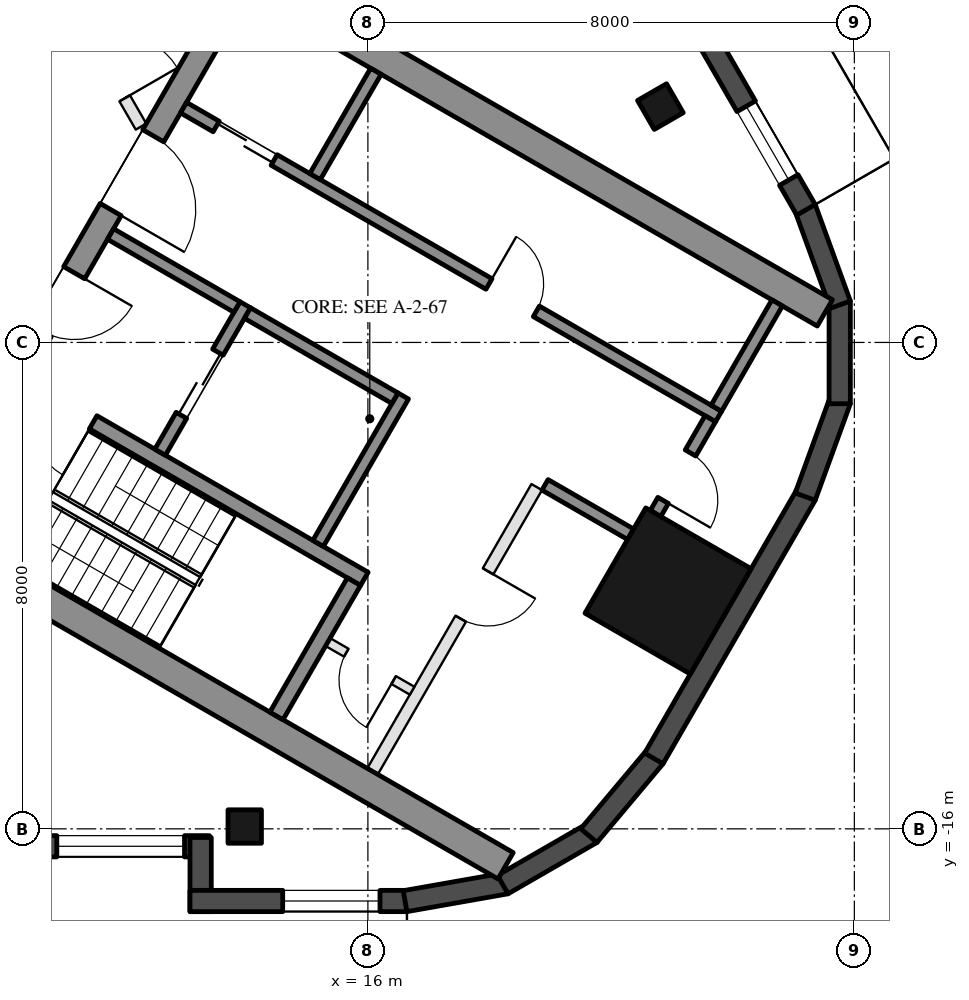
"""IFC4 building model, lengths in metres.
Left out: names, types, materials, properties, quantities, classifications, styles, units other than length and angle.
Written with IfcOpenShell. Run it as: python <this file> out.ifc"""

import sys

from ifc_helpers import new_model, si_unit, direction, frame, frame_2d, origin, origin_2d, place, context, subcontext, project, spatial, rectangle, hollow_rectangle, extrude, boolean, halfspace, element, fill, save


model = new_model("IFC4")
c1 = context("Model", 3, precision=1e-05, world=origin(), true_north=direction((0.0, 1.0)))
c2 = subcontext(c1, "Body", "Model", "MODEL_VIEW")
j1 = project(units=[si_unit("LENGTHUNIT", "METRE"), si_unit("PLANEANGLEUNIT", "RADIAN")], contexts=[c1])
p1 = place(None, origin())
s1 = spatial("IfcSite", under=j1, at=p1, CompositionType="ELEMENT")
p2 = place(p1, origin())
s2 = spatial("IfcBuilding", under=s1, at=p2, CompositionType="ELEMENT")
p3 = place(p2, frame((0.0, 0.0, 291.1)))
s3 = spatial("IfcBuildingStorey", under=s2, at=p3, CompositionType="ELEMENT", Elevation=291.1)
for number, where, z_axis, x_axis in (
    (1, (13.974, -15.962, 0.0), (0.0, 0.0, 1.0), (-1.0, 0.0, 0.0)),
    (2, (20.81, -4.121, 0.0), (0.0, 0.0, 1.0), (-0.5, 0.866, 0.0)),
):
    element("IfcColumn", number, at=place(p3, frame(where, z_axis=z_axis, x_axis=x_axis)), inside=s3, PredefinedType="COLUMN", context=c2, shape_type="SweptSolid", body=[
        boolean("DIFFERENCE", extrude(hollow_rectangle(XDim=0.55, YDim=0.55, WallThickness=0.025, at=origin_2d()), origin(), (0.0, 0.0, 1.0), 3.7), halfspace(frame((0.0, 0.0, 0.04), z_axis=(0.0, 0.0, 1.0), x_axis=(1.0, 0.0, 0.0)), True)),
    ])
p4 = place(p3, frame((20.936, -12.087, 0.0), z_axis=(0.0, 0.0, 1.0), x_axis=(0.5, 0.866025403784, 0.0)))
e3 = element("IfcColumn", 3, at=p4, inside=s3, PredefinedType="COLUMN", context=c2, shape_type="SweptSolid", body=[
    boolean("DIFFERENCE", extrude(hollow_rectangle(XDim=2.0, YDim=2.0, WallThickness=0.05, at=origin_2d()), origin(), (0.0, 0.0, 1.0), 3.7), halfspace(frame((0.0, 0.0, 0.113), z_axis=(0.0, 0.0, 1.0), x_axis=(1.0, 0.0, 0.0)), True)),
])
p5 = place(p3, frame((7.567, -16.287, 0.0), z_axis=(0.0, 0.0, 1.0), x_axis=(1.0, 0.0, 0.0)))
e4 = element("IfcWall", 4, at=p5, inside=s3, PredefinedType="SOLIDWALL", context=c2, shape_type="SweptSolid", body=[
    extrude(rectangle(XDim=5.827, YDim=0.35, at=frame_2d((2.914, 0.0))), origin(), (0.0, 0.0, 1.0), 3.55),
])
p6 = place(p5, frame((0.617, 0.0, 0.0)))
e5 = element("IfcOpeningElement", 5, at=p6, cuts=e4, PredefinedType="OPENING", context=c2, shape_type="SweptSolid", body=[
    extrude(rectangle(XDim=2.4, YDim=2.4, at=frame_2d((1.2, 1.2))), frame((0.0, 0.185, 0.0), z_axis=(0.0, -1.0, 0.0), x_axis=(1.0, 0.0, 0.0)), (0.0, 0.0, 1.0), 0.37),
])
p7 = place(p5, frame((3.317, 0.0, 0.3)))
e6 = element("IfcOpeningElement", 6, at=p7, cuts=e4, PredefinedType="OPENING", context=c2, shape_type="SweptSolid", body=[
    extrude(rectangle(XDim=2.1, YDim=2.65, at=frame_2d((1.05, 1.325))), frame((0.0, 0.185, 0.0), z_axis=(0.0, -1.0, 0.0), x_axis=(1.0, 0.0, 0.0)), (0.0, 0.0, 1.0), 0.37),
])
p8 = place(p3, frame((13.249, -16.142, 0.0), z_axis=(0.0, 0.0, 1.0), x_axis=(0.0, -1.0, 0.0)))
e7 = element("IfcWall", 7, at=p8, inside=s3, PredefinedType="SOLIDWALL", context=c2, shape_type="SweptSolid", body=[
    extrude(rectangle(XDim=1.22, YDim=0.35, at=frame_2d((0.61, 0.0))), origin(), (0.0, 0.0, 1.0), 3.55),
])
p9 = place(p3, frame((13.074, -17.187, 0.0), z_axis=(0.0, 0.0, 1.0), x_axis=(1.0, 0.0, 0.0)))
e8 = element("IfcWall", 8, at=p9, inside=s3, PredefinedType="SOLIDWALL", context=c2, shape_type="SweptSolid", body=[
    extrude(rectangle(XDim=3.567, YDim=0.35, at=frame_2d((1.784, 0.0))), origin(), (0.0, 0.0, 1.0), 3.55),
])
p10 = place(p9, frame((1.525, 0.0, 0.3)))
e9 = element("IfcOpeningElement", 9, at=p10, cuts=e8, PredefinedType="OPENING", context=c2, shape_type="SweptSolid", body=[
    extrude(rectangle(XDim=1.6, YDim=2.65, at=frame_2d((0.8, 1.325))), frame((0.0, 0.185, 0.0), z_axis=(0.0, -1.0, 0.0), x_axis=(1.0, 0.0, 0.0)), (0.0, 0.0, 1.0), 0.37),
])
for number, where, z_axis, x_axis in (
    (10, (16.611, -17.189, 0.0), (0.0, 0.0, 1.0), (0.985, 0.174, 0.0)),
    (11, (18.218, -16.917, 0.0), (0.0, 0.0, 1.0), (0.866, 0.5, 0.0)),
):
    element("IfcWall", number, at=place(p3, frame(where, z_axis=z_axis, x_axis=x_axis)), inside=s3, PredefinedType="SOLIDWALL", context=c2, shape_type="SweptSolid", body=[
        extrude(rectangle(XDim=1.689, YDim=0.35, at=frame_2d((0.845, 0.0))), origin(), (0.0, 0.0, 1.0), 3.55),
    ])
p11 = place(p3, frame((19.635, -16.111, 0.0), z_axis=(0.0, 0.0, 1.0), x_axis=(0.642697100627, 0.766120380127, 0.0)))
e12 = element("IfcWall", 12, at=p11, inside=s3, PredefinedType="SOLIDWALL", context=c2, shape_type="SweptSolid", body=[
    extrude(rectangle(XDim=1.689, YDim=0.35, at=frame_2d((0.845, 0.0))), origin(), (0.0, 0.0, 1.0), 3.55),
])
p12 = place(p3, frame((20.703, -14.842, 0.0), z_axis=(0.0, 0.0, 1.0), x_axis=(0.500016662025, 0.866015783746, 0.0)))
e13 = element("IfcWall", 13, at=p12, inside=s3, PredefinedType="SOLIDWALL", context=c2, shape_type="SweptSolid", body=[
    extrude(rectangle(XDim=5.004, YDim=0.35, at=frame_2d((2.502, 0.0))), origin(), (0.0, 0.0, 1.0), 3.55),
])
for number, where, z_axis, x_axis in (
    (14, (23.192, -10.536, 0.0), (0.0, 0.0, 1.0), (0.342, 0.94, 0.0)),
    (15, (23.759, -9.008, 0.0), (0.0, 0.0, 1.0), (0.0, 1.0, 0.0)),
    (16, (23.77, -7.379, 0.0), (0.0, 0.0, 1.0), (-0.342, 0.94, 0.0)),
):
    element("IfcWall", number, at=place(p3, frame(where, z_axis=z_axis, x_axis=x_axis)), inside=s3, PredefinedType="SOLIDWALL", context=c2, shape_type="SweptSolid", body=[
        extrude(rectangle(XDim=1.689, YDim=0.35, at=frame_2d((0.845, 0.0))), origin(), (0.0, 0.0, 1.0), 3.55),
    ])
p13 = place(p3, frame((23.205, -5.819, 0.0), z_axis=(0.0, 0.0, 1.0), x_axis=(-0.500010118922, 0.866019561543, 0.0)))
e17 = element("IfcWall", 17, at=p13, inside=s3, PredefinedType="SOLIDWALL", context=c2, shape_type="SweptSolid", body=[
    extrude(rectangle(XDim=10.554, YDim=0.35, at=frame_2d((5.277, 0.0))), origin(), (0.0, 0.0, 1.0), 3.55),
])
p14 = place(p13, frame((0.566, 0.0, 0.3)))
e18 = element("IfcOpeningElement", 18, at=p14, cuts=e17, PredefinedType="OPENING", context=c2, shape_type="SweptSolid", body=[
    extrude(rectangle(XDim=1.4, YDim=2.65, at=frame_2d((0.7, 1.325))), frame((0.0, 0.185, 0.0), z_axis=(0.0, -1.0, 0.0), x_axis=(1.0, 0.0, 0.0)), (0.0, 0.0, 1.0), 0.37),
])
p15 = place(p13, frame((6.63, 0.0, 0.0)))
e19 = element("IfcOpeningElement", 19, at=p15, cuts=e17, PredefinedType="OPENING", context=c2, shape_type="SweptSolid", body=[
    extrude(rectangle(XDim=2.4, YDim=2.4, at=frame_2d((1.2, 1.2))), frame((0.0, 0.185, 0.0), z_axis=(0.0, -1.0, 0.0), x_axis=(1.0, 0.0, 0.0)), (0.0, 0.0, 1.0), 0.37),
])
p16 = place(p13, frame((3.292, 0.0, 0.3)))
e20 = element("IfcOpeningElement", 20, at=p16, cuts=e17, PredefinedType="OPENING", context=c2, shape_type="SweptSolid", body=[
    extrude(rectangle(XDim=3.0, YDim=2.65, at=frame_2d((1.5, 1.325))), frame((0.0, 0.185, 0.0), z_axis=(0.0, -1.0, 0.0), x_axis=(1.0, 0.0, 0.0)), (0.0, 0.0, 1.0), 0.37),
])
for number, where, z_axis, x_axis in (
    (21, (8.547, -10.997, 0.0), (0.0, 0.0, 1.0), (0.866, -0.5, 0.0)),
    (22, (13.797, -1.903, 0.0), (0.0, 0.0, 1.0), (0.866, -0.5, 0.0)),
):
    element("IfcWall", number, at=place(p3, frame(where, z_axis=z_axis, x_axis=x_axis)), inside=s3, PredefinedType="SHEAR", context=c2, shape_type="SweptSolid", body=[
        extrude(rectangle(XDim=11.222, YDim=0.5, at=frame_2d((5.611, 0.0))), origin(), (0.0, 0.0, 1.0), 3.5),
    ])
p17 = place(p3, frame((8.845, -10.88, 0.0), z_axis=(0.0, 0.0, 1.0), x_axis=(0.500004234368, 0.866022959057, 0.0)))
e23 = element("IfcWall", 23, at=p17, inside=s3, PredefinedType="SHEAR", context=c2, shape_type="SweptSolid", body=[
    extrude(rectangle(XDim=10.0, YDim=0.4, at=frame_2d((5.0, 0.0))), origin(), (0.0, 0.0, 1.0), 3.5),
])
p18 = place(p17, frame((3.55, 0.0, 0.0)))
e24 = element("IfcOpeningElement", 24, at=p18, cuts=e23, PredefinedType="OPENING", context=c2, shape_type="SweptSolid", body=[
    extrude(rectangle(XDim=1.1, YDim=2.1, at=frame_2d((0.55, 1.05))), frame((0.0, 0.21, 0.0), z_axis=(0.0, -1.0, 0.0), x_axis=(1.0, 0.0, 0.0)), (0.0, 0.0, 1.0), 0.42),
])
p19 = place(p17, frame((5.85, 0.0, 0.0)))
e25 = element("IfcOpeningElement", 25, at=p19, cuts=e23, PredefinedType="OPENING", context=c2, shape_type="SweptSolid", body=[
    extrude(rectangle(XDim=1.4, YDim=2.1, at=frame_2d((0.7, 1.05))), frame((0.0, 0.21, 0.0), z_axis=(0.0, -1.0, 0.0), x_axis=(1.0, 0.0, 0.0)), (0.0, 0.0, 1.0), 0.42),
])
p20 = place(p3, frame((10.356, -8.664, 0.0), z_axis=(0.0, 0.0, 1.0), x_axis=(0.866028629588, -0.499994412703, 0.0)))
e26 = element("IfcWall", 26, at=p20, inside=s3, PredefinedType="SHEAR", context=c2, shape_type="SweptSolid", body=[
    extrude(rectangle(XDim=6.45, YDim=0.25, at=frame_2d((3.225, 0.0))), origin(), (0.0, 0.0, 1.0), 3.5),
])
p21 = place(p20, frame((0.3, 0.0, 0.0)))
e27 = element("IfcOpeningElement", 27, at=p21, cuts=e26, PredefinedType="OPENING", context=c2, shape_type="SweptSolid", body=[
    extrude(rectangle(XDim=1.0, YDim=2.1, at=frame_2d((0.5, 1.05))), frame((0.0, 0.135, 0.0), z_axis=(0.0, -1.0, 0.0), x_axis=(1.0, 0.0, 0.0)), (0.0, 0.0, 1.0), 0.27),
])
p22 = place(p3, frame((14.496, -14.143, 0.0), z_axis=(0.0, 0.0, 1.0), x_axis=(0.500062241894, 0.865989465428, 0.0)))
e28 = element("IfcWall", 28, at=p22, inside=s3, PredefinedType="SHEAR", context=c2, shape_type="SweptSolid", body=[
    extrude(rectangle(XDim=2.55, YDim=0.25, at=frame_2d((1.275, 0.0))), origin(), (0.0, 0.0, 1.0), 3.5),
])
p23 = place(p3, frame((15.181, -11.305, 0.0), z_axis=(0.0, 0.0, 1.0), x_axis=(0.49994636267, 0.866056369097, 0.0)))
e29 = element("IfcWall", 29, at=p23, inside=s3, PredefinedType="SHEAR", context=c2, shape_type="SweptSolid", body=[
    extrude(rectangle(XDim=2.8, YDim=0.2, at=frame_2d((1.4, 0.0))), origin(), (0.0, 0.0, 1.0), 3.5),
])
p24 = place(p3, frame((12.583, -9.805, 0.0), z_axis=(0.0, 0.0, 1.0), x_axis=(0.49994636267, 0.866056369097, 0.0)))
e30 = element("IfcWall", 30, at=p24, inside=s3, PredefinedType="SHEAR", context=c2, shape_type="SweptSolid", body=[
    extrude(rectangle(XDim=2.8, YDim=0.2, at=frame_2d((1.4, 0.0))), origin(), (0.0, 0.0, 1.0), 3.5),
])
p25 = place(p24, frame((0.7, 0.0, 0.0)))
e31 = element("IfcOpeningElement", 31, at=p25, cuts=e30, PredefinedType="OPENING", context=c2, shape_type="SweptSolid", body=[
    extrude(rectangle(XDim=1.2, YDim=2.1, at=frame_2d((0.6, 1.05))), frame((0.0, 0.11, 0.0), z_axis=(0.0, -1.0, 0.0), x_axis=(1.0, 0.0, 0.0)), (0.0, 0.0, 1.0), 0.22),
])
p26 = place(p3, frame((11.768, -6.217, 0.0), z_axis=(0.0, 0.0, 1.0), x_axis=(0.866050077142, -0.499957262057, 0.0)))
e32 = element("IfcWall", 32, at=p26, inside=s3, PredefinedType="SHEAR", context=c2, shape_type="SweptSolid", body=[
    extrude(rectangle(XDim=2.4, YDim=0.2, at=frame_2d((1.2, 0.0))), origin(), (0.0, 0.0, 1.0), 3.5),
])
p27 = place(p3, frame((14.02, -7.517, 0.0), z_axis=(0.0, 0.0, 1.0), x_axis=(0.866034573852, -0.49998411664, 0.0)))
e33 = element("IfcWall", 33, at=p27, inside=s3, PredefinedType="SHEAR", context=c2, shape_type="SweptSolid", body=[
    extrude(rectangle(XDim=2.8, YDim=0.2, at=frame_2d((1.4, 0.0))), origin(), (0.0, 0.0, 1.0), 3.5),
])
p28 = place(p3, frame((12.968, -4.138, 0.0), z_axis=(0.0, 0.0, 1.0), x_axis=(0.866028328073, -0.49999493495, 0.0)))
e34 = element("IfcWall", 34, at=p28, inside=s3, PredefinedType="SHEAR", context=c2, shape_type="SweptSolid", body=[
    extrude(rectangle(XDim=10.16, YDim=0.2, at=frame_2d((5.08, 0.0))), origin(), (0.0, 0.0, 1.0), 3.5),
])
p29 = place(p28, frame((0.62, 0.0, 0.0)))
e35 = element("IfcOpeningElement", 35, at=p29, cuts=e34, PredefinedType="OPENING", context=c2, shape_type="SweptSolid", body=[
    extrude(rectangle(XDim=1.1, YDim=2.1, at=frame_2d((0.55, 1.05))), frame((0.0, 0.11, 0.0), z_axis=(0.0, -1.0, 0.0), x_axis=(1.0, 0.0, 0.0)), (0.0, 0.0, 1.0), 0.22),
])
p30 = place(p28, frame((5.8, 0.0, 0.0)))
e36 = element("IfcOpeningElement", 36, at=p30, cuts=e34, PredefinedType="OPENING", context=c2, shape_type="SweptSolid", body=[
    extrude(rectangle(XDim=0.9, YDim=2.1, at=frame_2d((0.45, 1.05))), frame((0.0, 0.11, 0.0), z_axis=(0.0, -1.0, 0.0), x_axis=(1.0, 0.0, 0.0)), (0.0, 0.0, 1.0), 0.22),
])
p31 = place(p3, frame((20.73, -10.814, 0.0), z_axis=(0.0, 0.0, 1.0), x_axis=(0.499961193289, 0.866047807691, 0.0)))
e37 = element("IfcWall", 37, at=p31, inside=s3, PredefinedType="SHEAR", context=c2, shape_type="SweptSolid", body=[
    extrude(rectangle(XDim=1.8, YDim=0.2, at=frame_2d((0.9, 0.0))), origin(), (0.0, 0.0, 1.0), 3.5),
])
p32 = place(p31, frame((0.25, 0.0, 0.0)))
e38 = element("IfcOpeningElement", 38, at=p32, cuts=e37, PredefinedType="OPENING", context=c2, shape_type="SweptSolid", body=[
    extrude(rectangle(XDim=0.9, YDim=2.1, at=frame_2d((0.45, 1.05))), frame((0.0, 0.11, 0.0), z_axis=(0.0, -1.0, 0.0), x_axis=(1.0, 0.0, 0.0)), (0.0, 0.0, 1.0), 0.22),
])
p33 = place(p3, frame((18.913, -10.342, 0.0), z_axis=(0.0, 0.0, 1.0), x_axis=(0.866053003207, -0.499952193351, 0.0)))
e39 = element("IfcWall", 39, at=p33, inside=s3, PredefinedType="SHEAR", context=c2, shape_type="SweptSolid", body=[
    extrude(rectangle(XDim=1.625, YDim=0.2, at=frame_2d((0.812, 0.0))), origin(), (0.0, 0.0, 1.0), 3.5),
])
for number, where, z_axis, x_axis in (
    (40, (15.131, -5.272, 0.0), (0.0, 0.0, 1.0), (0.5, 0.866, 0.0)),
    (41, (21.73, -9.082, 0.0), (0.0, 0.0, 1.0), (0.5, 0.866, 0.0)),
):
    element("IfcWall", number, at=place(p3, frame(where, z_axis=z_axis, x_axis=x_axis)), inside=s3, PredefinedType="SHEAR", context=c2, shape_type="SweptSolid", body=[
        extrude(rectangle(XDim=2.0, YDim=0.2, at=frame_2d((1.0, 0.0))), origin(), (0.0, 0.0, 1.0), 3.5),
    ])
p34 = place(p3, frame((16.076, -15.055, 0.0), z_axis=(0.0, 0.0, 1.0), x_axis=(0.499995103361, 0.866028230842, 0.0)))
e42 = element("IfcWall", 42, at=p34, inside=s3, PredefinedType="PARTITIONING", context=c2, shape_type="SweptSolid", body=[
    extrude(rectangle(XDim=5.4, YDim=0.2, at=frame_2d((2.7, 0.0))), origin(), (0.0, 0.0, 1.0), 3.5),
])
p35 = place(p34, frame((2.9, 0.0, 0.0)))
e43 = element("IfcOpeningElement", 43, at=p35, cuts=e42, PredefinedType="OPENING", context=c2, shape_type="SweptSolid", body=[
    extrude(rectangle(XDim=0.9, YDim=2.1, at=frame_2d((0.45, 1.05))), frame((0.0, 0.11, 0.0), z_axis=(0.0, -1.0, 0.0), x_axis=(1.0, 0.0, 0.0)), (0.0, 0.0, 1.0), 0.22),
])
p36 = place(p3, frame((15.342, -12.928, 0.0), z_axis=(0.0, 0.0, 1.0), x_axis=(0.865989903783, -0.500061482766, 0.0)))
e44 = element("IfcWall", 44, at=p36, inside=s3, PredefinedType="PARTITIONING", context=c2, shape_type="SweptSolid", body=[
    extrude(rectangle(XDim=1.6, YDim=0.15, at=frame_2d((0.8, 0.0))), origin(), (0.0, 0.0, 1.0), 3.5),
])
p37 = place(p36, frame((0.35, 0.0, 0.0)))
e45 = element("IfcOpeningElement", 45, at=p37, cuts=e44, PredefinedType="OPENING", context=c2, shape_type="SweptSolid", body=[
    extrude(rectangle(XDim=0.9, YDim=2.1, at=frame_2d((0.45, 1.05))), frame((0.0, 0.085, 0.0), z_axis=(0.0, -1.0, 0.0), x_axis=(1.0, 0.0, 0.0)), (0.0, 0.0, 1.0), 0.17),
])
p38 = place(p3, frame((10.269, -0.986, 0.0), z_axis=(0.0, 0.0, 1.0), x_axis=(0.50004472278, -0.865999581536, 0.0)))
e46 = element("IfcWall", 46, at=p38, inside=s3, PredefinedType="PARTITIONING", context=c2, shape_type="SweptSolid", body=[
    extrude(rectangle(XDim=4.0, YDim=0.2, at=frame_2d((2.0, 0.0))), origin(), (0.0, 0.0, 1.0), 3.05),
])
p39 = place(p38, frame((2.463, 0.0, 0.0)))
e47 = element("IfcOpeningElement", 47, at=p39, cuts=e46, PredefinedType="OPENING", context=c2, shape_type="SweptSolid", body=[
    extrude(rectangle(XDim=1.0, YDim=2.1, at=frame_2d((0.5, 1.05))), frame((0.0, 0.11, 0.0), z_axis=(0.0, -1.0, 0.0), x_axis=(1.0, 0.0, 0.0)), (0.0, 0.0, 1.0), 0.22),
])
p40 = place(p7, origin())
e48 = element("IfcWindow", 48, at=p40, inside=s3, PartitioningType="SINGLE_PANEL", PredefinedType="WINDOW", context=c2, shape_type="SweptSolid", body=[
    extrude(rectangle(XDim=2.1, YDim=2.65, at=frame_2d((1.05, 1.325))), frame((0.0, 0.03, 0.0), z_axis=(0.0, -1.0, 0.0), x_axis=(1.0, 0.0, 0.0)), (0.0, 0.0, 1.0), 0.06),
])
fill(e6, e48)
p41 = place(p10, origin())
e49 = element("IfcWindow", 49, at=p41, inside=s3, PartitioningType="SINGLE_PANEL", PredefinedType="WINDOW", context=c2, shape_type="SweptSolid", body=[
    extrude(rectangle(XDim=1.6, YDim=2.65, at=frame_2d((0.8, 1.325))), frame((0.0, 0.03, 0.0), z_axis=(0.0, -1.0, 0.0), x_axis=(1.0, 0.0, 0.0)), (0.0, 0.0, 1.0), 0.06),
])
fill(e9, e49)
p42 = place(p14, origin())
e50 = element("IfcWindow", 50, at=p42, inside=s3, PartitioningType="SINGLE_PANEL", PredefinedType="WINDOW", context=c2, shape_type="SweptSolid", body=[
    extrude(rectangle(XDim=1.4, YDim=2.65, at=frame_2d((0.7, 1.325))), frame((0.0, 0.03, 0.0), z_axis=(0.0, -1.0, 0.0), x_axis=(1.0, 0.0, 0.0)), (0.0, 0.0, 1.0), 0.06),
])
fill(e18, e50)
p43 = place(p25, origin())
e51 = element("IfcDoor", 51, at=p43, inside=s3, OperationType="DOUBLE_DOOR_SLIDING", PredefinedType="DOOR", context=c2, shape_type="SweptSolid", body=[
    extrude(rectangle(XDim=1.2, YDim=2.1, at=frame_2d((0.6, 1.05))), frame((0.0, 0.025, 0.0), z_axis=(0.0, -1.0, 0.0), x_axis=(1.0, 0.0, 0.0)), (0.0, 0.0, 1.0), 0.05),
])
fill(e31, e51)
p44 = place(p37, frame((0.9, 0.0, 0.0), z_axis=(0.0, 0.0, 1.0), x_axis=(-1.0, 0.0, 0.0)))
e52 = element("IfcDoor", 52, at=p44, inside=s3, OperationType="SINGLE_SWING_LEFT", PredefinedType="DOOR", context=c2, shape_type="SweptSolid", body=[
    extrude(rectangle(XDim=0.9, YDim=2.1, at=frame_2d((0.45, 1.05))), frame((0.0, 0.025, 0.0), z_axis=(0.0, -1.0, 0.0), x_axis=(1.0, 0.0, 0.0)), (0.0, 0.0, 1.0), 0.05),
])
fill(e45, e52)
p45 = place(p29, origin())
e53 = element("IfcDoor", 53, at=p45, inside=s3, OperationType="DOUBLE_DOOR_SLIDING", PredefinedType="DOOR", context=c2, shape_type="SweptSolid", body=[
    extrude(rectangle(XDim=1.1, YDim=2.1, at=frame_2d((0.55, 1.05))), frame((0.0, 0.025, 0.0), z_axis=(0.0, -1.0, 0.0), x_axis=(1.0, 0.0, 0.0)), (0.0, 0.0, 1.0), 0.05),
])
fill(e35, e53)
p46 = place(p30, origin())
e54 = element("IfcDoor", 54, at=p46, inside=s3, OperationType="SINGLE_SWING_LEFT", PredefinedType="DOOR", context=c2, shape_type="SweptSolid", body=[
    extrude(rectangle(XDim=0.9, YDim=2.1, at=frame_2d((0.45, 1.05))), frame((0.0, 0.025, 0.0), z_axis=(0.0, -1.0, 0.0), x_axis=(1.0, 0.0, 0.0)), (0.0, 0.0, 1.0), 0.05),
])
fill(e36, e54)
p47 = place(p32, frame((0.9, 0.0, 0.0), z_axis=(0.0, 0.0, 1.0), x_axis=(-1.0, 0.0, 0.0)))
e55 = element("IfcDoor", 55, at=p47, inside=s3, OperationType="SINGLE_SWING_RIGHT", PredefinedType="DOOR", context=c2, shape_type="SweptSolid", body=[
    extrude(rectangle(XDim=0.9, YDim=2.1, at=frame_2d((0.45, 1.05))), frame((0.0, 0.025, 0.0), z_axis=(0.0, -1.0, 0.0), x_axis=(1.0, 0.0, 0.0)), (0.0, 0.0, 1.0), 0.05),
])
fill(e38, e55)
p48 = place(p35, frame((0.9, 0.0, 0.0), z_axis=(0.0, 0.0, 1.0), x_axis=(-1.0, 0.0, 0.0)))
e56 = element("IfcDoor", 56, at=p48, inside=s3, OperationType="SINGLE_SWING_LEFT", PredefinedType="DOOR", context=c2, shape_type="SweptSolid", body=[
    extrude(rectangle(XDim=0.9, YDim=2.1, at=frame_2d((0.45, 1.05))), frame((0.0, 0.025, 0.0), z_axis=(0.0, -1.0, 0.0), x_axis=(1.0, 0.0, 0.0)), (0.0, 0.0, 1.0), 0.05),
])
fill(e43, e56)
p49 = place(p18, frame((1.1, 0.0, 0.0), z_axis=(0.0, 0.0, 1.0), x_axis=(-1.0, 0.0, 0.0)))
e57 = element("IfcDoor", 57, at=p49, inside=s3, OperationType="SINGLE_SWING_LEFT", PredefinedType="DOOR", context=c2, shape_type="SweptSolid", body=[
    extrude(rectangle(XDim=1.1, YDim=2.1, at=frame_2d((0.55, 1.05))), frame((0.0, 0.025, 0.0), z_axis=(0.0, -1.0, 0.0), x_axis=(1.0, 0.0, 0.0)), (0.0, 0.0, 1.0), 0.05),
])
fill(e24, e57)
p50 = place(p19, frame((1.4, 0.0, 0.0), z_axis=(0.0, 0.0, 1.0), x_axis=(-1.0, 0.0, 0.0)))
e58 = element("IfcDoor", 58, at=p50, inside=s3, OperationType="DOUBLE_DOOR_SINGLE_SWING", PredefinedType="DOOR", context=c2, shape_type="SweptSolid", body=[
    extrude(rectangle(XDim=1.4, YDim=2.1, at=frame_2d((0.7, 1.05))), frame((0.0, 0.025, 0.0), z_axis=(0.0, -1.0, 0.0), x_axis=(1.0, 0.0, 0.0)), (0.0, 0.0, 1.0), 0.05),
])
fill(e25, e58)
p51 = place(p21, frame((1.0, 0.0, 0.0), z_axis=(0.0, 0.0, 1.0), x_axis=(-1.0, 0.0, 0.0)))
e59 = element("IfcDoor", 59, at=p51, inside=s3, OperationType="SINGLE_SWING_LEFT", PredefinedType="DOOR", context=c2, shape_type="SweptSolid", body=[
    extrude(rectangle(XDim=1.0, YDim=2.1, at=frame_2d((0.5, 1.05))), frame((0.0, 0.025, 0.0), z_axis=(0.0, -1.0, 0.0), x_axis=(1.0, 0.0, 0.0)), (0.0, 0.0, 1.0), 0.05),
])
fill(e27, e59)
p52 = place(p39, origin())
e60 = element("IfcDoor", 60, at=p52, inside=s3, OperationType="SINGLE_SWING_RIGHT", PredefinedType="DOOR", context=c2, shape_type="SweptSolid", body=[
    extrude(rectangle(XDim=1.0, YDim=2.1, at=frame_2d((0.5, 1.05))), frame((0.0, 0.025, 0.0), z_axis=(0.0, -1.0, 0.0), x_axis=(1.0, 0.0, 0.0)), (0.0, 0.0, 1.0), 0.05),
])
fill(e47, e60)
save(model, sys.argv[1])
